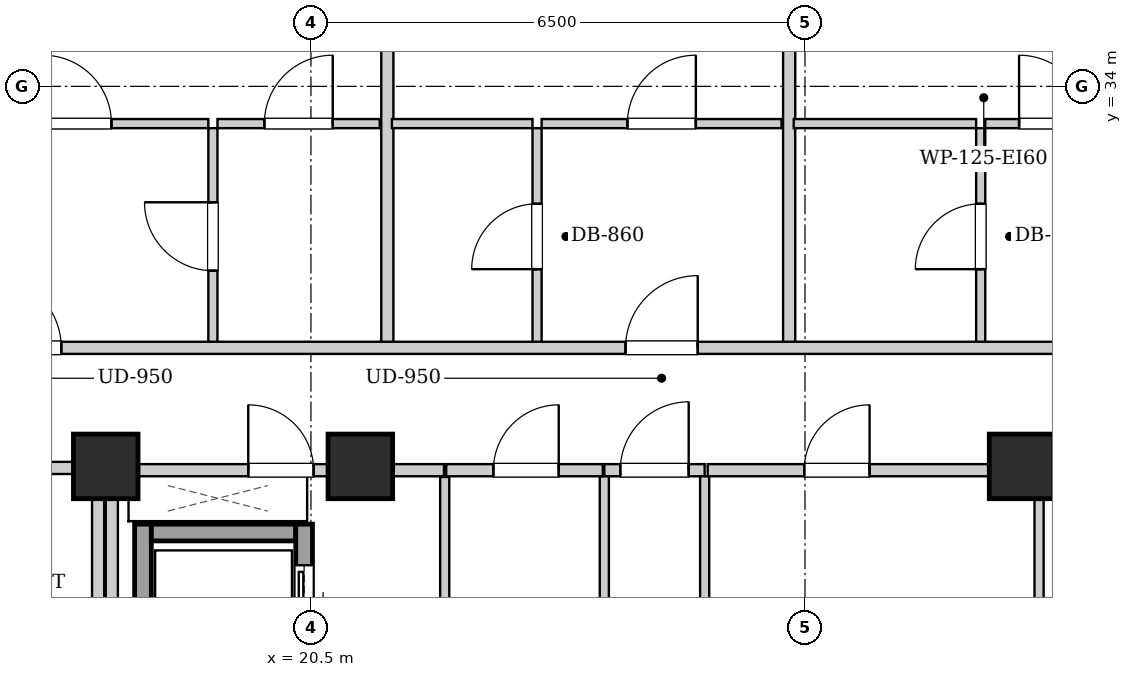
"""IFC4 building model, lengths in metres.
Left out: names, types, materials, properties, quantities, classifications, styles, units other than length and angle.
Written with IfcOpenShell. Run it as: python <this file> out.ifc"""

import sys

from ifc_helpers import new_model, si_unit, direction, frame, frame_2d, origin, origin_2d, place, context, subcontext, project, spatial, rectangle, extrude, element, fill, save


model = new_model("IFC4")
c1 = context("Model", 3, precision=1e-05, world=origin(), true_north=direction((0.0, 1.0)))
c2 = subcontext(c1, "Body", "Model", "MODEL_VIEW")
j1 = project(units=[si_unit("LENGTHUNIT", "METRE"), si_unit("PLANEANGLEUNIT", "RADIAN")], contexts=[c1])
p1 = place(None, origin())
s1 = spatial("IfcSite", under=j1, at=p1, CompositionType="ELEMENT")
p2 = place(p1, origin())
s2 = spatial("IfcBuilding", under=s1, at=p2, CompositionType="ELEMENT")
p3 = place(p2, frame((0.0, 0.0, 190.9)))
s3 = spatial("IfcBuildingStorey", under=s2, at=p3, CompositionType="ELEMENT", Elevation=190.9)
for number, where, z_axis, x_axis in (
    (1, (17.8, 29.0, 0.0), (0.0, 0.0, 1.0), (1.0, 0.0, 0.0)),
    (2, (21.15, 29.0, 0.0), (0.0, 0.0, 1.0), (1.0, 0.0, 0.0)),
    (3, (29.85, 29.0, 0.0), (0.0, 0.0, 1.0), (1.0, 0.0, 0.0)),
):
    element("IfcColumn", number, at=place(p3, frame(where, z_axis=z_axis, x_axis=x_axis)), inside=s3, PredefinedType="COLUMN", context=c2, shape_type="SweptSolid", body=[
        extrude(rectangle(XDim=0.85, YDim=0.85, at=origin_2d()), origin(), (0.0, 0.0, 1.0), 3.3),
    ])
p4 = place(p3, frame((18.29, 24.1, 0.0), z_axis=(0.0, 0.0, 1.0), x_axis=(0.0, 1.0, 0.0)))
e4 = element("IfcWall", 4, at=p4, inside=s3, PredefinedType="SHEAR", context=c2, shape_type="SweptSolid", body=[
    extrude(rectangle(XDim=4.14, YDim=0.22, at=frame_2d((2.07, 0.0))), origin(), (0.0, 0.0, 1.0), 3.04),
])
p5 = place(p3, frame((18.4, 28.13, 0.0), z_axis=(0.0, 0.0, 1.0), x_axis=(1.0, 0.0, 0.0)))
e5 = element("IfcWall", 5, at=p5, inside=s3, PredefinedType="SHEAR", context=c2, shape_type="SweptSolid", body=[
    extrude(rectangle(XDim=1.9, YDim=0.22, at=frame_2d((0.95, 0.0))), origin(), (0.0, 0.0, 1.0), 3.04),
])
p6 = place(p3, frame((20.41, 26.06, 0.0), z_axis=(0.0, 0.0, 1.0), x_axis=(0.0, 1.0, 0.0)))
e6 = element("IfcWall", 6, at=p6, inside=s3, PredefinedType="SHEAR", context=c2, shape_type="SweptSolid", body=[
    extrude(rectangle(XDim=2.18, YDim=0.22, at=frame_2d((1.09, 0.0))), origin(), (0.0, 0.0, 1.0), 3.04),
])
p7 = place(p6, frame((0.54, 0.0, 0.0)))
e7 = element("IfcOpeningElement", 7, at=p7, cuts=e6, PredefinedType="OPENING", context=c2, shape_type="SweptSolid", body=[
    extrude(rectangle(XDim=1.1, YDim=2.15, at=frame_2d((0.55, 1.075))), frame((0.0, 0.12, 0.0), z_axis=(0.0, -1.0, 0.0), x_axis=(1.0, 0.0, 0.0)), (0.0, 0.0, 1.0), 0.24),
])
p8 = place(p3, frame((17.88, 24.12, 0.0), z_axis=(0.0, 0.0, 1.0), x_axis=(0.0, 1.0, 0.0)))
e8 = element("IfcWall", 8, at=p8, inside=s3, PredefinedType="PARTITIONING", context=c2, shape_type="SweptSolid", body=[
    extrude(rectangle(XDim=4.76, YDim=0.16, at=frame_2d((2.38, 0.0))), origin(), (0.0, 0.0, 1.0), 3.04),
])
p9 = place(p3, frame((24.36, 28.95, 0.0), z_axis=(0.0, 0.0, 1.0), x_axis=(1.0, 0.0, 0.0)))
e9 = element("IfcWall", 9, at=p9, inside=s3, PredefinedType="PARTITIONING", context=c2, shape_type="SweptSolid", body=[
    extrude(rectangle(XDim=1.32, YDim=0.16, at=frame_2d((0.66, 0.0))), origin(), (0.0, 0.0, 1.0), 2.556),
])
p10 = place(p9, frame((0.21, 0.0, 0.0)))
e10 = element("IfcOpeningElement", 10, at=p10, cuts=e9, PredefinedType="OPENING", context=c2, shape_type="SweptSolid", body=[
    extrude(rectangle(XDim=0.9, YDim=2.05, at=frame_2d((0.45, 1.025))), frame((0.0, 0.09, 0.0), z_axis=(0.0, -1.0, 0.0), x_axis=(1.0, 0.0, 0.0)), (0.0, 0.0, 1.0), 0.18),
])
p11 = place(p3, frame((17.96, 28.95, 0.0), z_axis=(0.0, 0.0, 1.0), x_axis=(1.0, 0.0, 0.0)))
e11 = element("IfcWall", 11, at=p11, inside=s3, PredefinedType="PARTITIONING", context=c2, shape_type="SweptSolid", body=[
    extrude(rectangle(XDim=4.29, YDim=0.16, at=frame_2d((2.145, 0.0))), origin(), (0.0, 0.0, 1.0), 2.556),
])
p12 = place(p11, frame((1.715, 0.0, 0.0)))
e12 = element("IfcOpeningElement", 12, at=p12, cuts=e11, PredefinedType="OPENING", context=c2, shape_type="SweptSolid", body=[
    extrude(rectangle(XDim=0.86, YDim=2.05, at=frame_2d((0.43, 1.025))), frame((0.0, 0.09, 0.0), z_axis=(0.0, -1.0, 0.0), x_axis=(1.0, 0.0, 0.0)), (0.0, 0.0, 1.0), 0.18),
])
for number, where, z_axis, x_axis in (
    (13, (24.36, 25.0, 0.0), (0.0, 0.0, 1.0), (0.0, 1.0, 0.0)),
    (14, (25.68, 25.0, 0.0), (0.0, 0.0, 1.0), (0.0, 1.0, 0.0)),
):
    element("IfcWall", number, at=place(p3, frame(where, z_axis=z_axis, x_axis=x_axis)), inside=s3, PredefinedType="PARTITIONING", context=c2, shape_type="SweptSolid", body=[
        extrude(rectangle(XDim=3.87, YDim=0.12, at=frame_2d((1.935, 0.0))), origin(), (0.0, 0.0, 1.0), 3.04),
    ])
p13 = place(p3, frame((30.08, 26.18, 0.0), z_axis=(0.0, 0.0, 1.0), x_axis=(0.0, 1.0, 0.0)))
e15 = element("IfcWall", 15, at=p13, inside=s3, PredefinedType="PARTITIONING", context=c2, shape_type="SweptSolid", body=[
    extrude(rectangle(XDim=2.68, YDim=0.12, at=frame_2d((1.34, 0.0))), origin(), (0.0, 0.0, 1.0), 3.04),
])
p14 = place(p3, frame((30.08, 28.95, 0.0), z_axis=(0.0, 0.0, 1.0), x_axis=(1.0, 0.0, 0.0)))
e16 = element("IfcWall", 16, at=p14, inside=s3, PredefinedType="PARTITIONING", context=c2, shape_type="SweptSolid", body=[
    extrude(rectangle(XDim=2.96, YDim=0.16, at=frame_2d((1.48, 0.0))), origin(), (0.0, 0.0, 1.0), 3.04),
])
p15 = place(p14, frame((0.695, 0.0, 0.0)))
e17 = element("IfcOpeningElement", 17, at=p15, cuts=e16, PredefinedType="OPENING", context=c2, shape_type="SweptSolid", body=[
    extrude(rectangle(XDim=0.86, YDim=2.05, at=frame_2d((0.43, 1.025))), frame((0.0, 0.09, 0.0), z_axis=(0.0, -1.0, 0.0), x_axis=(1.0, 0.0, 0.0)), (0.0, 0.0, 1.0), 0.18),
])
p16 = place(p3, frame((22.26, 25.0, 0.0), z_axis=(0.0, 0.0, 1.0), x_axis=(0.0, 1.0, 0.0)))
e18 = element("IfcWall", 18, at=p16, inside=s3, PredefinedType="PARTITIONING", context=c2, shape_type="SweptSolid", body=[
    extrude(rectangle(XDim=3.86, YDim=0.12, at=frame_2d((1.93, 0.0))), origin(), (0.0, 0.0, 1.0), 3.04),
])
p17 = place(p3, frame((22.28, 28.95, 0.0), z_axis=(0.0, 0.0, 1.0), x_axis=(1.0, 0.0, 0.0)))
e19 = element("IfcWall", 19, at=p17, inside=s3, PredefinedType="PARTITIONING", context=c2, shape_type="SweptSolid", body=[
    extrude(rectangle(XDim=2.06, YDim=0.16, at=frame_2d((1.03, 0.0))), origin(), (0.0, 0.0, 1.0), 2.556),
])
p18 = place(p17, frame((0.62, 0.0, 0.0)))
e20 = element("IfcOpeningElement", 20, at=p18, cuts=e19, PredefinedType="OPENING", context=c2, shape_type="SweptSolid", body=[
    extrude(rectangle(XDim=0.86, YDim=2.05, at=frame_2d((0.43, 1.025))), frame((0.0, 0.09, 0.0), z_axis=(0.0, -1.0, 0.0), x_axis=(1.0, 0.0, 0.0)), (0.0, 0.0, 1.0), 0.18),
])
p19 = place(p3, frame((25.72, 28.95, 0.0), z_axis=(0.0, 0.0, 1.0), x_axis=(1.0, 0.0, 0.0)))
e21 = element("IfcWall", 21, at=p19, inside=s3, PredefinedType="PARTITIONING", context=c2, shape_type="SweptSolid", body=[
    extrude(rectangle(XDim=4.32, YDim=0.16, at=frame_2d((2.16, 0.0))), origin(), (0.0, 0.0, 1.0), 2.556),
])
p20 = place(p19, frame((1.27, 0.0, 0.0)))
e22 = element("IfcOpeningElement", 22, at=p20, cuts=e21, PredefinedType="OPENING", context=c2, shape_type="SweptSolid", body=[
    extrude(rectangle(XDim=0.86, YDim=2.05, at=frame_2d((0.43, 1.025))), frame((0.0, 0.09, 0.0), z_axis=(0.0, -1.0, 0.0), x_axis=(1.0, 0.0, 0.0)), (0.0, 0.0, 1.0), 0.18),
])
p21 = place(p3, frame((19.21, 30.6, 0.0), z_axis=(0.0, 0.0, 1.0), x_axis=(0.0, 1.0, 0.0)))
e23 = element("IfcWall", 23, at=p21, inside=s3, PredefinedType="PARTITIONING", context=c2, shape_type="SweptSolid", body=[
    extrude(rectangle(XDim=2.85, YDim=0.12, at=frame_2d((1.425, 0.0))), origin(), (0.0, 0.0, 1.0), 3.04),
])
p22 = place(p21, frame((0.975, 0.0, 0.0)))
e24 = element("IfcOpeningElement", 24, at=p22, cuts=e23, PredefinedType="OPENING", context=c2, shape_type="SweptSolid", body=[
    extrude(rectangle(XDim=0.9, YDim=2.05, at=frame_2d((0.45, 1.025))), frame((0.0, 0.07, 0.0), z_axis=(0.0, -1.0, 0.0), x_axis=(1.0, 0.0, 0.0)), (0.0, 0.0, 1.0), 0.14),
])
p23 = place(p3, frame((15.7, 33.51, 0.0), z_axis=(0.0, 0.0, 1.0), x_axis=(1.0, 0.0, 0.0)))
e25 = element("IfcWall", 25, at=p23, inside=s3, PredefinedType="PARTITIONING", context=c2, shape_type="SweptSolid", body=[
    extrude(rectangle(XDim=3.45, YDim=0.12, at=frame_2d((1.725, 0.0))), origin(), (0.0, 0.0, 1.0), 3.04),
])
p24 = place(p23, frame((1.275, 0.0, 0.0)))
e26 = element("IfcOpeningElement", 26, at=p24, cuts=e25, PredefinedType="OPENING", context=c2, shape_type="SweptSolid", body=[
    extrude(rectangle(XDim=0.9, YDim=2.05, at=frame_2d((0.45, 1.025))), frame((0.0, 0.07, 0.0), z_axis=(0.0, -1.0, 0.0), x_axis=(1.0, 0.0, 0.0)), (0.0, 0.0, 1.0), 0.14),
])
p25 = place(p3, frame((19.27, 33.51, 0.0), z_axis=(0.0, 0.0, 1.0), x_axis=(1.0, 0.0, 0.0)))
e27 = element("IfcWall", 27, at=p25, inside=s3, PredefinedType="PARTITIONING", context=c2, shape_type="SweptSolid", body=[
    extrude(rectangle(XDim=2.135, YDim=0.12, at=frame_2d((1.067, 0.0))), origin(), (0.0, 0.0, 1.0), 3.04),
])
p26 = place(p25, frame((0.617, 0.0, 0.0)))
e28 = element("IfcOpeningElement", 28, at=p26, cuts=e27, PredefinedType="OPENING", context=c2, shape_type="SweptSolid", body=[
    extrude(rectangle(XDim=0.9, YDim=2.05, at=frame_2d((0.45, 1.025))), frame((0.0, 0.07, 0.0), z_axis=(0.0, -1.0, 0.0), x_axis=(1.0, 0.0, 0.0)), (0.0, 0.0, 1.0), 0.14),
])
p27 = place(p3, frame((21.505, 30.6, 0.0), z_axis=(0.0, 0.0, 1.0), x_axis=(0.0, 1.0, 0.0)))
e29 = element("IfcWall", 29, at=p27, inside=s3, PredefinedType="PARTITIONING", context=c2, shape_type="SweptSolid", body=[
    extrude(rectangle(XDim=9.32, YDim=0.16, at=frame_2d((4.66, 0.0))), origin(), (0.0, 0.0, 1.0), 3.04),
])
p28 = place(p3, frame((23.475, 30.6, 0.0), z_axis=(0.0, 0.0, 1.0), x_axis=(0.0, 1.0, 0.0)))
e30 = element("IfcWall", 30, at=p28, inside=s3, PredefinedType="PARTITIONING", context=c2, shape_type="SweptSolid", body=[
    extrude(rectangle(XDim=2.85, YDim=0.12, at=frame_2d((1.425, 0.0))), origin(), (0.0, 0.0, 1.0), 3.04),
])
p29 = place(p28, frame((0.995, 0.0, 0.0)))
e31 = element("IfcOpeningElement", 31, at=p29, cuts=e30, PredefinedType="OPENING", context=c2, shape_type="SweptSolid", body=[
    extrude(rectangle(XDim=0.86, YDim=2.05, at=frame_2d((0.43, 1.025))), frame((0.0, 0.07, 0.0), z_axis=(0.0, -1.0, 0.0), x_axis=(1.0, 0.0, 0.0)), (0.0, 0.0, 1.0), 0.14),
])
p30 = place(p3, frame((21.565, 33.51, 0.0), z_axis=(0.0, 0.0, 1.0), x_axis=(1.0, 0.0, 0.0)))
e32 = element("IfcWall", 32, at=p30, inside=s3, PredefinedType="PARTITIONING", context=c2, shape_type="SweptSolid", body=[
    extrude(rectangle(XDim=1.85, YDim=0.12, at=frame_2d((0.925, 0.0))), origin(), (0.0, 0.0, 1.0), 3.04),
])
p31 = place(p3, frame((23.535, 33.51, 0.0), z_axis=(0.0, 0.0, 1.0), x_axis=(1.0, 0.0, 0.0)))
e33 = element("IfcWall", 33, at=p31, inside=s3, PredefinedType="PARTITIONING", context=c2, shape_type="SweptSolid", body=[
    extrude(rectangle(XDim=3.157, YDim=0.12, at=frame_2d((1.579, 0.0))), origin(), (0.0, 0.0, 1.0), 3.04),
])
p32 = place(p31, frame((1.129, 0.0, 0.0)))
e34 = element("IfcOpeningElement", 34, at=p32, cuts=e33, PredefinedType="OPENING", context=c2, shape_type="SweptSolid", body=[
    extrude(rectangle(XDim=0.9, YDim=2.05, at=frame_2d((0.45, 1.025))), frame((0.0, 0.07, 0.0), z_axis=(0.0, -1.0, 0.0), x_axis=(1.0, 0.0, 0.0)), (0.0, 0.0, 1.0), 0.14),
])
p33 = place(p3, frame((26.792, 30.6, 0.0), z_axis=(0.0, 0.0, 1.0), x_axis=(0.0, 1.0, 0.0)))
e35 = element("IfcWall", 35, at=p33, inside=s3, PredefinedType="PARTITIONING", context=c2, shape_type="SweptSolid", body=[
    extrude(rectangle(XDim=9.32, YDim=0.16, at=frame_2d((4.66, 0.0))), origin(), (0.0, 0.0, 1.0), 3.04),
])
p34 = place(p3, frame((29.312, 30.6, 0.0), z_axis=(0.0, 0.0, 1.0), x_axis=(0.0, 1.0, 0.0)))
e36 = element("IfcWall", 36, at=p34, inside=s3, PredefinedType="PARTITIONING", context=c2, shape_type="SweptSolid", body=[
    extrude(rectangle(XDim=2.85, YDim=0.12, at=frame_2d((1.425, 0.0))), origin(), (0.0, 0.0, 1.0), 3.04),
])
p35 = place(p34, frame((0.995, 0.0, 0.0)))
e37 = element("IfcOpeningElement", 37, at=p35, cuts=e36, PredefinedType="OPENING", context=c2, shape_type="SweptSolid", body=[
    extrude(rectangle(XDim=0.86, YDim=2.05, at=frame_2d((0.43, 1.025))), frame((0.0, 0.07, 0.0), z_axis=(0.0, -1.0, 0.0), x_axis=(1.0, 0.0, 0.0)), (0.0, 0.0, 1.0), 0.14),
])
p36 = place(p3, frame((26.852, 33.51, 0.0), z_axis=(0.0, 0.0, 1.0), x_axis=(1.0, 0.0, 0.0)))
e38 = element("IfcWall", 38, at=p36, inside=s3, PredefinedType="PARTITIONING", context=c2, shape_type="SweptSolid", body=[
    extrude(rectangle(XDim=2.4, YDim=0.12, at=frame_2d((1.2, 0.0))), origin(), (0.0, 0.0, 1.0), 3.04),
])
p37 = place(p3, frame((29.372, 33.51, 0.0), z_axis=(0.0, 0.0, 1.0), x_axis=(1.0, 0.0, 0.0)))
e39 = element("IfcWall", 39, at=p37, inside=s3, PredefinedType="PARTITIONING", context=c2, shape_type="SweptSolid", body=[
    extrude(rectangle(XDim=1.791, YDim=0.12, at=frame_2d((0.896, 0.0))), origin(), (0.0, 0.0, 1.0), 3.04),
])
p38 = place(p37, frame((0.445, 0.0, 0.0)))
e40 = element("IfcOpeningElement", 40, at=p38, cuts=e39, PredefinedType="OPENING", context=c2, shape_type="SweptSolid", body=[
    extrude(rectangle(XDim=0.9, YDim=2.05, at=frame_2d((0.45, 1.025))), frame((0.0, 0.07, 0.0), z_axis=(0.0, -1.0, 0.0), x_axis=(1.0, 0.0, 0.0)), (0.0, 0.0, 1.0), 0.14),
])
p39 = place(p3, frame((10.88, 28.98, 0.0), z_axis=(0.0, 0.0, 1.0), x_axis=(1.0, 0.0, 0.0)))
e41 = element("IfcWall", 41, at=p39, inside=s3, PredefinedType="PARTITIONING", context=c2, shape_type="SweptSolid", body=[
    extrude(rectangle(XDim=6.88, YDim=0.16, at=frame_2d((3.44, 0.0))), origin(), (0.0, 0.0, 1.0), 2.556),
])
p40 = place(p39, frame((5.06, 0.0, 0.0)))
e42 = element("IfcOpeningElement", 42, at=p40, cuts=e41, PredefinedType="OPENING", context=c2, shape_type="SweptSolid", body=[
    extrude(rectangle(XDim=0.95, YDim=2.1, at=frame_2d((0.475, 1.05))), frame((0.0, 0.09, 0.0), z_axis=(0.0, -1.0, 0.0), x_axis=(1.0, 0.0, 0.0)), (0.0, 0.0, 1.0), 0.18),
])
p41 = place(p3, frame((13.15, 30.56, 0.0), z_axis=(0.0, 0.0, 1.0), x_axis=(1.0, 0.0, 0.0)))
e43 = element("IfcWall", 43, at=p41, inside=s3, PredefinedType="PARTITIONING", context=c2, shape_type="SweptSolid", body=[
    extrude(rectangle(XDim=24.6, YDim=0.16, at=frame_2d((12.3, 0.0))), origin(), (0.0, 0.0, 1.0), 3.04),
])
p42 = place(p41, frame((3.115, 0.0, 0.0)))
e44 = element("IfcOpeningElement", 44, at=p42, cuts=e43, PredefinedType="OPENING", context=c2, shape_type="SweptSolid", body=[
    extrude(rectangle(XDim=0.95, YDim=2.1, at=frame_2d((0.475, 1.05))), frame((0.0, 0.09, 0.0), z_axis=(0.0, -1.0, 0.0), x_axis=(1.0, 0.0, 0.0)), (0.0, 0.0, 1.0), 0.18),
])
p43 = place(p41, frame((11.489, 0.0, 0.0)))
e45 = element("IfcOpeningElement", 45, at=p43, cuts=e43, PredefinedType="OPENING", context=c2, shape_type="SweptSolid", body=[
    extrude(rectangle(XDim=0.95, YDim=2.1, at=frame_2d((0.475, 1.05))), frame((0.0, 0.09, 0.0), z_axis=(0.0, -1.0, 0.0), x_axis=(1.0, 0.0, 0.0)), (0.0, 0.0, 1.0), 0.18),
])
p44 = place(p41, frame((17.707, 0.0, 0.0)))
e46 = element("IfcOpeningElement", 46, at=p44, cuts=e43, PredefinedType="OPENING", context=c2, shape_type="SweptSolid", body=[
    extrude(rectangle(XDim=0.95, YDim=2.1, at=frame_2d((0.475, 1.05))), frame((0.0, 0.09, 0.0), z_axis=(0.0, -1.0, 0.0), x_axis=(1.0, 0.0, 0.0)), (0.0, 0.0, 1.0), 0.18),
])
p45 = place(p3, frame((17.7, 15.02, 0.0), z_axis=(0.0, 0.0, 1.0), x_axis=(0.0, 1.0, 0.0)))
e47 = element("IfcWall", 47, at=p45, inside=s3, PredefinedType="PARTITIONING", context=c2, shape_type="SweptSolid", body=[
    extrude(rectangle(XDim=13.98, YDim=0.16, at=frame_2d((6.99, 0.0))), origin(), (0.0, 0.0, 1.0), 3.04),
])
p46 = place(p7, origin())
e48 = element("IfcDoor", 48, at=p46, inside=s3, OperationType="SLIDING_TO_LEFT", PredefinedType="DOOR", context=c2, shape_type="SweptSolid", body=[
    extrude(rectangle(XDim=1.1, YDim=2.15, at=frame_2d((0.55, 1.075))), frame((0.0, 0.025, 0.0), z_axis=(0.0, -1.0, 0.0), x_axis=(1.0, 0.0, 0.0)), (0.0, 0.0, 1.0), 0.05),
])
fill(e7, e48)
p47 = place(p10, origin())
e49 = element("IfcDoor", 49, at=p47, inside=s3, OperationType="SINGLE_SWING_RIGHT", PredefinedType="DOOR", context=c2, shape_type="SweptSolid", body=[
    extrude(rectangle(XDim=0.9, YDim=2.05, at=frame_2d((0.45, 1.025))), frame((0.0, 0.025, 0.0), z_axis=(0.0, -1.0, 0.0), x_axis=(1.0, 0.0, 0.0)), (0.0, 0.0, 1.0), 0.05),
])
fill(e10, e49)
p48 = place(p12, origin())
e50 = element("IfcDoor", 50, at=p48, inside=s3, OperationType="SINGLE_SWING_LEFT", PredefinedType="DOOR", context=c2, shape_type="SweptSolid", body=[
    extrude(rectangle(XDim=0.86, YDim=2.05, at=frame_2d((0.43, 1.025))), frame((0.0, 0.025, 0.0), z_axis=(0.0, -1.0, 0.0), x_axis=(1.0, 0.0, 0.0)), (0.0, 0.0, 1.0), 0.05),
])
fill(e12, e50)
p49 = place(p18, origin())
e51 = element("IfcDoor", 51, at=p49, inside=s3, OperationType="SINGLE_SWING_RIGHT", PredefinedType="DOOR", context=c2, shape_type="SweptSolid", body=[
    extrude(rectangle(XDim=0.86, YDim=2.05, at=frame_2d((0.43, 1.025))), frame((0.0, 0.025, 0.0), z_axis=(0.0, -1.0, 0.0), x_axis=(1.0, 0.0, 0.0)), (0.0, 0.0, 1.0), 0.05),
])
fill(e20, e51)
p50 = place(p20, origin())
e52 = element("IfcDoor", 52, at=p50, inside=s3, OperationType="SINGLE_SWING_RIGHT", PredefinedType="DOOR", context=c2, shape_type="SweptSolid", body=[
    extrude(rectangle(XDim=0.86, YDim=2.05, at=frame_2d((0.43, 1.025))), frame((0.0, 0.025, 0.0), z_axis=(0.0, -1.0, 0.0), x_axis=(1.0, 0.0, 0.0)), (0.0, 0.0, 1.0), 0.05),
])
fill(e22, e52)
p51 = place(p22, origin())
e53 = element("IfcDoor", 53, at=p51, inside=s3, OperationType="SINGLE_SWING_RIGHT", PredefinedType="DOOR", context=c2, shape_type="SweptSolid", body=[
    extrude(rectangle(XDim=0.9, YDim=2.05, at=frame_2d((0.45, 1.025))), frame((0.0, 0.025, 0.0), z_axis=(0.0, -1.0, 0.0), x_axis=(1.0, 0.0, 0.0)), (0.0, 0.0, 1.0), 0.05),
])
fill(e24, e53)
p52 = place(p24, origin())
e54 = element("IfcDoor", 54, at=p52, inside=s3, OperationType="SINGLE_SWING_LEFT", PredefinedType="DOOR", context=c2, shape_type="SweptSolid", body=[
    extrude(rectangle(XDim=0.9, YDim=2.05, at=frame_2d((0.45, 1.025))), frame((0.0, 0.025, 0.0), z_axis=(0.0, -1.0, 0.0), x_axis=(1.0, 0.0, 0.0)), (0.0, 0.0, 1.0), 0.05),
])
fill(e26, e54)
p53 = place(p26, origin())
e55 = element("IfcDoor", 55, at=p53, inside=s3, OperationType="SINGLE_SWING_RIGHT", PredefinedType="DOOR", context=c2, shape_type="SweptSolid", body=[
    extrude(rectangle(XDim=0.9, YDim=2.05, at=frame_2d((0.45, 1.025))), frame((0.0, 0.025, 0.0), z_axis=(0.0, -1.0, 0.0), x_axis=(1.0, 0.0, 0.0)), (0.0, 0.0, 1.0), 0.05),
])
fill(e28, e55)
p54 = place(p29, origin())
e56 = element("IfcDoor", 56, at=p54, inside=s3, OperationType="SINGLE_SWING_LEFT", PredefinedType="DOOR", context=c2, shape_type="SweptSolid", body=[
    extrude(rectangle(XDim=0.86, YDim=2.05, at=frame_2d((0.43, 1.025))), frame((0.0, 0.025, 0.0), z_axis=(0.0, -1.0, 0.0), x_axis=(1.0, 0.0, 0.0)), (0.0, 0.0, 1.0), 0.05),
])
fill(e31, e56)
p55 = place(p32, origin())
e57 = element("IfcDoor", 57, at=p55, inside=s3, OperationType="SINGLE_SWING_RIGHT", PredefinedType="DOOR", context=c2, shape_type="SweptSolid", body=[
    extrude(rectangle(XDim=0.9, YDim=2.05, at=frame_2d((0.45, 1.025))), frame((0.0, 0.025, 0.0), z_axis=(0.0, -1.0, 0.0), x_axis=(1.0, 0.0, 0.0)), (0.0, 0.0, 1.0), 0.05),
])
fill(e34, e57)
p56 = place(p35, origin())
e58 = element("IfcDoor", 58, at=p56, inside=s3, OperationType="SINGLE_SWING_LEFT", PredefinedType="DOOR", context=c2, shape_type="SweptSolid", body=[
    extrude(rectangle(XDim=0.86, YDim=2.05, at=frame_2d((0.43, 1.025))), frame((0.0, 0.025, 0.0), z_axis=(0.0, -1.0, 0.0), x_axis=(1.0, 0.0, 0.0)), (0.0, 0.0, 1.0), 0.05),
])
fill(e37, e58)
p57 = place(p38, origin())
e59 = element("IfcDoor", 59, at=p57, inside=s3, OperationType="SINGLE_SWING_LEFT", PredefinedType="DOOR", context=c2, shape_type="SweptSolid", body=[
    extrude(rectangle(XDim=0.9, YDim=2.05, at=frame_2d((0.45, 1.025))), frame((0.0, 0.025, 0.0), z_axis=(0.0, -1.0, 0.0), x_axis=(1.0, 0.0, 0.0)), (0.0, 0.0, 1.0), 0.05),
])
fill(e40, e59)
p58 = place(p42, origin())
e60 = element("IfcDoor", 60, at=p58, inside=s3, OperationType="SINGLE_SWING_LEFT", PredefinedType="DOOR", context=c2, shape_type="SweptSolid", body=[
    extrude(rectangle(XDim=0.95, YDim=2.1, at=frame_2d((0.475, 1.05))), frame((0.0, 0.025, 0.0), z_axis=(0.0, -1.0, 0.0), x_axis=(1.0, 0.0, 0.0)), (0.0, 0.0, 1.0), 0.05),
])
fill(e44, e60)
p59 = place(p43, origin())
e61 = element("IfcDoor", 61, at=p59, inside=s3, OperationType="SINGLE_SWING_RIGHT", PredefinedType="DOOR", context=c2, shape_type="SweptSolid", body=[
    extrude(rectangle(XDim=0.95, YDim=2.1, at=frame_2d((0.475, 1.05))), frame((0.0, 0.025, 0.0), z_axis=(0.0, -1.0, 0.0), x_axis=(1.0, 0.0, 0.0)), (0.0, 0.0, 1.0), 0.05),
])
fill(e45, e61)
save(model, sys.argv[1])
